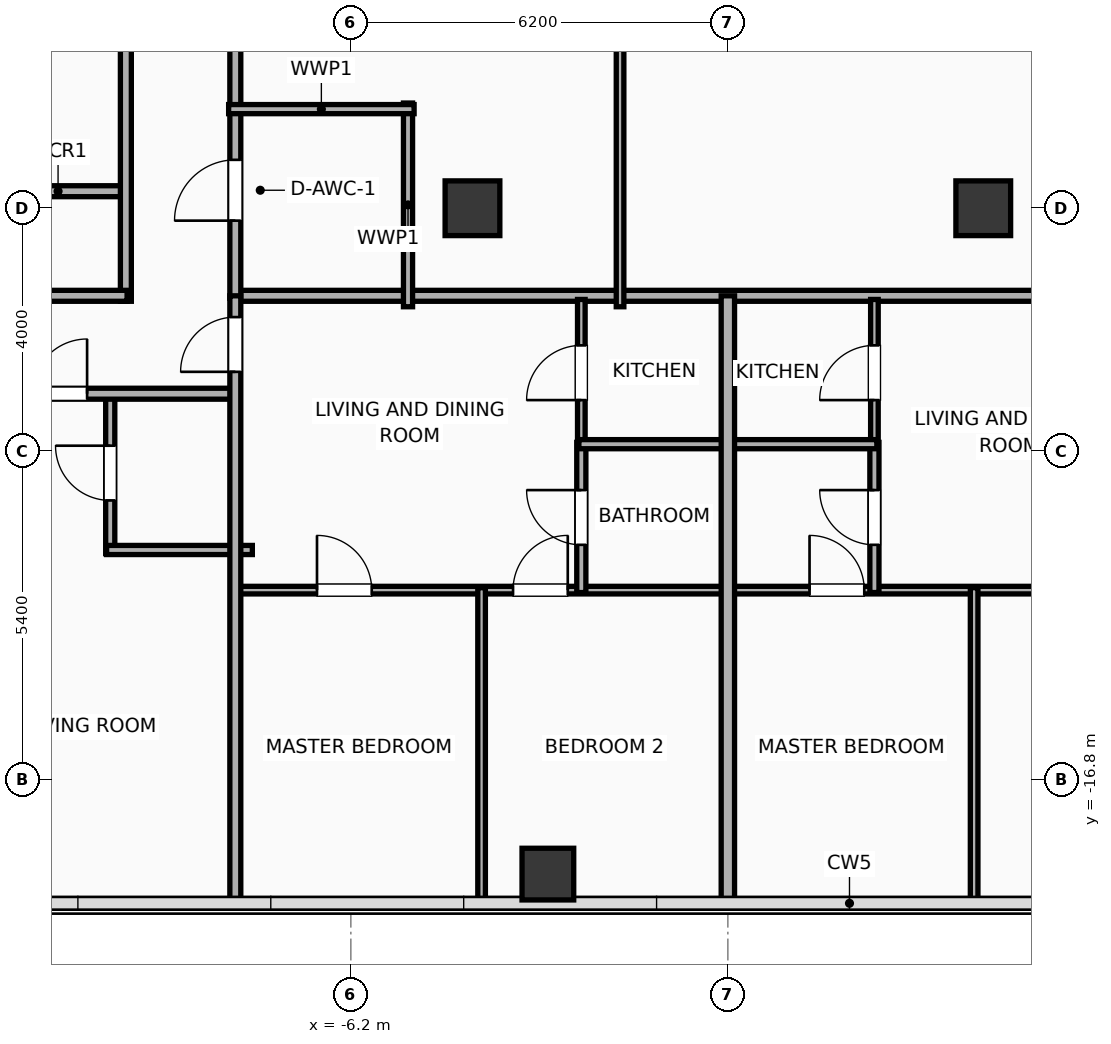
"""IFC4 building model, lengths in metres.
Left out: names, types, materials, properties, quantities, classifications, styles, units other than length and angle.
Written with IfcOpenShell. Run it as: python <this file> out.ifc"""

import sys

from ifc_helpers import new_model, si_unit, direction, frame, frame_2d, origin, origin_2d, place, context, subcontext, project, spatial, rectangle, hollow_rectangle, extrude, element, fill, save


model = new_model("IFC4")
c1 = context("Model", 3, precision=1e-05, world=origin(), true_north=direction((0.0, 1.0)))
c2 = subcontext(c1, "Body", "Model", "MODEL_VIEW")
j1 = project(units=[si_unit("LENGTHUNIT", "METRE"), si_unit("PLANEANGLEUNIT", "RADIAN")], contexts=[c1])
p1 = place(None, origin())
s1 = spatial("IfcSite", under=j1, at=p1, CompositionType="ELEMENT")
p2 = place(p1, origin())
s2 = spatial("IfcBuilding", under=s1, at=p2, CompositionType="ELEMENT")
p3 = place(p2, frame((0.0, 0.0, 204.1)))
s3 = spatial("IfcBuildingStorey", under=s2, at=p3, CompositionType="ELEMENT", Elevation=204.1)
for number, where, z_axis, x_axis in (
    (1, (-4.2, -7.4, 0.0), (0.0, 0.0, 1.0), (1.0, 0.0, 0.0)),
    (2, (4.2, -7.4, 0.0), (0.0, 0.0, 1.0), (1.0, 0.0, 0.0)),
):
    element("IfcColumn", number, at=place(p3, frame(where, z_axis=z_axis, x_axis=x_axis)), inside=s3, PredefinedType="COLUMN", context=c2, shape_type="SweptSolid", body=[
        extrude(rectangle(XDim=0.9, YDim=0.9, at=origin_2d()), origin(), (0.0, 0.0, 1.0), 3.9),
    ])
p4 = place(p3, frame((-2.96, -18.35, 0.0), z_axis=(0.0, 0.0, 1.0), x_axis=(1.0, 0.0, 0.0)))
e3 = element("IfcColumn", 3, at=p4, inside=s3, PredefinedType="COLUMN", context=c2, shape_type="SweptSolid", body=[
    extrude(hollow_rectangle(XDim=0.85, YDim=0.85, WallThickness=0.028, at=origin_2d()), origin(), (0.0, 0.0, 1.0), 3.9),
])
p5 = place(p3, frame((-12.15, -7.12, 0.0), z_axis=(0.0, 0.0, 1.0), x_axis=(1.0, 0.0, 0.0)))
e4 = element("IfcWall", 4, at=p5, inside=s3, PredefinedType="PARTITIONING", context=c2, shape_type="SweptSolid", body=[
    extrude(rectangle(XDim=2.27, YDim=0.18, at=frame_2d((1.135, 0.0))), origin(), (0.0, 0.0, 1.0), 3.65),
])
p6 = place(p3, frame((-9.9, -8.93, 0.0), z_axis=(0.0, 0.0, 1.0), x_axis=(0.0, 1.0, 0.0)))
e5 = element("IfcWall", 5, at=p6, inside=s3, PredefinedType="PARTITIONING", context=c2, shape_type="SweptSolid", body=[
    extrude(rectangle(XDim=17.86, YDim=0.18, at=frame_2d((8.93, 0.0))), origin(), (0.0, 0.0, 1.0), 3.65),
])
p7 = place(p6, frame((7.487, 0.0, 0.0)))
e6 = element("IfcOpeningElement", 6, at=p7, cuts=e5, PredefinedType="OPENING", context=c2, shape_type="SweptSolid", body=[
    extrude(rectangle(XDim=1.1, YDim=2.05, at=frame_2d((0.55, 1.025))), frame((0.0, 0.1, 0.0), z_axis=(0.0, -1.0, 0.0), x_axis=(1.0, 0.0, 0.0)), (0.0, 0.0, 1.0), 0.2),
])
p8 = place(p3, frame((-26.23, -8.84, 0.0), z_axis=(0.0, 0.0, 1.0), x_axis=(1.0, 0.0, 0.0)))
e7 = element("IfcWall", 7, at=p8, inside=s3, PredefinedType="PARTITIONING", context=c2, shape_type="SweptSolid", body=[
    extrude(rectangle(XDim=16.35, YDim=0.18, at=frame_2d((8.175, 0.0))), origin(), (0.0, 0.0, 1.0), 3.65),
])
p9 = place(p3, frame((-8.15, -8.84, 0.0), z_axis=(0.0, 0.0, 1.0), x_axis=(1.0, 0.0, 0.0)))
e8 = element("IfcWall", 8, at=p9, inside=s3, PredefinedType="PARTITIONING", context=c2, shape_type="SweptSolid", body=[
    extrude(rectangle(XDim=16.3, YDim=0.18, at=frame_2d((8.15, 0.0))), origin(), (0.0, 0.0, 1.0), 3.65),
])
p10 = place(p3, frame((-8.1, -8.88, 0.0), z_axis=(0.0, 0.0, 1.0), x_axis=(0.0, 1.0, 0.0)))
e9 = element("IfcWall", 9, at=p10, inside=s3, PredefinedType="PARTITIONING", context=c2, shape_type="SweptSolid", body=[
    extrude(rectangle(XDim=17.76, YDim=0.18, at=frame_2d((8.88, 0.0))), origin(), (0.0, 0.0, 1.0), 3.65),
])
p11 = place(p10, frame((1.276, 0.0, 0.0)))
e10 = element("IfcOpeningElement", 10, at=p11, cuts=e9, PredefinedType="OPENING", context=c2, shape_type="SweptSolid", body=[
    extrude(rectangle(XDim=1.0, YDim=2.05, at=frame_2d((0.5, 1.025))), frame((0.0, 0.1, 0.0), z_axis=(0.0, -1.0, 0.0), x_axis=(1.0, 0.0, 0.0)), (0.0, 0.0, 1.0), 0.2),
])
p12 = place(p10, frame((10.181, 0.0, 0.0)))
e11 = element("IfcOpeningElement", 11, at=p12, cuts=e9, PredefinedType="OPENING", context=c2, shape_type="SweptSolid", body=[
    extrude(rectangle(XDim=0.95, YDim=2.05, at=frame_2d((0.475, 1.025))), frame((0.0, 0.1, 0.0), z_axis=(0.0, -1.0, 0.0), x_axis=(1.0, 0.0, 0.0)), (0.0, 0.0, 1.0), 0.2),
])
p13 = place(p3, frame((-5.26, -9.02, 0.0), z_axis=(0.0, 0.0, 1.0), x_axis=(0.0, 1.0, 0.0)))
e12 = element("IfcWall", 12, at=p13, inside=s3, PredefinedType="PLUMBINGWALL", context=c2, shape_type="SweptSolid", body=[
    extrude(rectangle(XDim=3.35, YDim=0.15, at=frame_2d((1.675, 0.0))), origin(), (0.0, 0.0, 1.0), 3.65),
])
p14 = place(p3, frame((-8.21, -5.77, 0.0), z_axis=(0.0, 0.0, 1.0), x_axis=(1.0, 0.0, 0.0)))
e13 = element("IfcWall", 13, at=p14, inside=s3, PredefinedType="PLUMBINGWALL", context=c2, shape_type="SweptSolid", body=[
    extrude(rectangle(XDim=3.05, YDim=0.15, at=frame_2d((1.525, 0.0))), origin(), (0.0, 0.0, 1.0), 3.65),
])
p15 = place(p3, frame((-1.773, -9.02, 0.0), z_axis=(0.0, 0.0, 1.0), x_axis=(0.0, 1.0, 0.0)))
e14 = element("IfcWall", 14, at=p15, inside=s3, PredefinedType="PARTITIONING", context=c2, shape_type="SweptSolid", body=[
    extrude(rectangle(XDim=17.99, YDim=0.125, at=frame_2d((8.995, 0.0))), origin(), (0.0, 0.0, 1.0), 3.65),
])
p16 = place(p15, frame((8.52, 0.0, 0.0)))
e15 = element("IfcOpeningElement", 15, at=p16, cuts=e14, PredefinedType="OPENING", context=c2, shape_type="SweptSolid", body=[
    extrude(rectangle(XDim=0.95, YDim=2.05, at=frame_2d((0.475, 1.025))), frame((0.0, 0.073, 0.0), z_axis=(0.0, -1.0, 0.0), x_axis=(1.0, 0.0, 0.0)), (0.0, 0.0, 1.0), 0.145),
])
p17 = place(p3, frame((-10.157, -13.08, 0.0), z_axis=(0.0, 0.0, 1.0), x_axis=(0.0, 1.0, 0.0)))
e16 = element("IfcWall", 16, at=p17, inside=s3, PredefinedType="PLUMBINGWALL", context=c2, shape_type="SweptSolid", body=[
    extrude(rectangle(XDim=2.65, YDim=0.15, at=frame_2d((1.325, 0.0))), origin(), (0.0, 0.0, 1.0), 3.65),
])
p18 = place(p17, frame((0.875, 0.0, 0.0)))
e17 = element("IfcOpeningElement", 17, at=p18, cuts=e16, PredefinedType="OPENING", context=c2, shape_type="SweptSolid", body=[
    extrude(rectangle(XDim=0.9, YDim=2.05, at=frame_2d((0.45, 1.025))), frame((0.0, 0.085, 0.0), z_axis=(0.0, -1.0, 0.0), x_axis=(1.0, 0.0, 0.0)), (0.0, 0.0, 1.0), 0.17),
])
p19 = place(p3, frame((-10.217, -13.02, 0.0), z_axis=(0.0, 0.0, 1.0), x_axis=(1.0, 0.0, 0.0)))
e18 = element("IfcWall", 18, at=p19, inside=s3, PredefinedType="PLUMBINGWALL", context=c2, shape_type="SweptSolid", body=[
    extrude(rectangle(XDim=2.397, YDim=0.15, at=frame_2d((1.198, 0.0))), origin(), (0.0, 0.0, 1.0), 3.65),
])
p20 = place(p3, frame((-26.23, -10.45, 0.0), z_axis=(0.0, 0.0, 1.0), x_axis=(1.0, 0.0, 0.0)))
e19 = element("IfcWall", 19, at=p20, inside=s3, PredefinedType="PARTITIONING", context=c2, shape_type="SweptSolid", body=[
    extrude(rectangle(XDim=18.15, YDim=0.18, at=frame_2d((9.075, 0.0))), origin(), (0.0, 0.0, 1.0), 3.65),
])
p21 = place(p20, frame((2.414, 0.0, 0.0)))
e20 = element("IfcOpeningElement", 20, at=p21, cuts=e19, PredefinedType="OPENING", context=c2, shape_type="SweptSolid", body=[
    extrude(rectangle(XDim=1.15, YDim=2.05, at=frame_2d((0.575, 1.025))), frame((0.0, 0.1, 0.0), z_axis=(0.0, -1.0, 0.0), x_axis=(1.0, 0.0, 0.0)), (0.0, 0.0, 1.0), 0.2),
])
p22 = place(p20, frame((9.571, 0.0, 0.0)))
e21 = element("IfcOpeningElement", 21, at=p22, cuts=e19, PredefinedType="OPENING", context=c2, shape_type="SweptSolid", body=[
    extrude(rectangle(XDim=1.15, YDim=2.05, at=frame_2d((0.575, 1.025))), frame((0.0, 0.1, 0.0), z_axis=(0.0, -1.0, 0.0), x_axis=(1.0, 0.0, 0.0)), (0.0, 0.0, 1.0), 0.2),
])
p23 = place(p20, frame((14.792, 0.0, 0.0)))
e22 = element("IfcOpeningElement", 22, at=p23, cuts=e19, PredefinedType="OPENING", context=c2, shape_type="SweptSolid", body=[
    extrude(rectangle(XDim=0.9, YDim=2.05, at=frame_2d((0.45, 1.025))), frame((0.0, 0.1, 0.0), z_axis=(0.0, -1.0, 0.0), x_axis=(1.0, 0.0, 0.0)), (0.0, 0.0, 1.0), 0.2),
])
p24 = place(p3, frame((-8.08, -13.68, 0.0), z_axis=(0.0, 0.0, 1.0), x_axis=(1.0, 0.0, 0.0)))
e23 = element("IfcWall", 23, at=p24, inside=s3, PredefinedType="PARTITIONING", context=c2, shape_type="SweptSolid", body=[
    extrude(rectangle(XDim=8.06, YDim=0.125, at=frame_2d((4.03, 0.0))), origin(), (0.0, 0.0, 1.0), 3.65),
])
p25 = place(p24, frame((1.323, 0.0, 0.0)))
e24 = element("IfcOpeningElement", 24, at=p25, cuts=e23, PredefinedType="OPENING", context=c2, shape_type="SweptSolid", body=[
    extrude(rectangle(XDim=0.9, YDim=2.05, at=frame_2d((0.45, 1.025))), frame((0.0, 0.073, 0.0), z_axis=(0.0, -1.0, 0.0), x_axis=(1.0, 0.0, 0.0)), (0.0, 0.0, 1.0), 0.145),
])
p26 = place(p24, frame((4.547, 0.0, 0.0)))
e25 = element("IfcOpeningElement", 25, at=p26, cuts=e23, PredefinedType="OPENING", context=c2, shape_type="SweptSolid", body=[
    extrude(rectangle(XDim=0.9, YDim=2.05, at=frame_2d((0.45, 1.025))), frame((0.0, 0.073, 0.0), z_axis=(0.0, -1.0, 0.0), x_axis=(1.0, 0.0, 0.0)), (0.0, 0.0, 1.0), 0.145),
])
p27 = place(p3, frame((-2.41, -11.31, 0.0), z_axis=(0.0, 0.0, 1.0), x_axis=(0.0, 1.0, 0.0)))
e26 = element("IfcWall", 26, at=p27, inside=s3, PredefinedType="PARTITIONING", context=c2, shape_type="SweptSolid", body=[
    extrude(rectangle(XDim=2.41, YDim=0.125, at=frame_2d((1.205, 0.0))), origin(), (0.0, 0.0, 1.0), 3.65),
])
p28 = place(p27, frame((0.755, 0.0, 0.0)))
e27 = element("IfcOpeningElement", 27, at=p28, cuts=e26, PredefinedType="OPENING", context=c2, shape_type="SweptSolid", body=[
    extrude(rectangle(XDim=0.9, YDim=2.05, at=frame_2d((0.45, 1.025))), frame((0.0, 0.073, 0.0), z_axis=(0.0, -1.0, 0.0), x_axis=(1.0, 0.0, 0.0)), (0.0, 0.0, 1.0), 0.145),
])
p29 = place(p3, frame((-2.41, -13.72, 0.0), z_axis=(0.0, 0.0, 1.0), x_axis=(0.0, 1.0, 0.0)))
e28 = element("IfcWall", 28, at=p29, inside=s3, PredefinedType="PLUMBINGWALL", context=c2, shape_type="SweptSolid", body=[
    extrude(rectangle(XDim=2.47, YDim=0.15, at=frame_2d((1.235, 0.0))), origin(), (0.0, 0.0, 1.0), 3.65),
])
p30 = place(p29, frame((0.785, 0.0, 0.0)))
e29 = element("IfcOpeningElement", 29, at=p30, cuts=e28, PredefinedType="OPENING", context=c2, shape_type="SweptSolid", body=[
    extrude(rectangle(XDim=0.9, YDim=2.05, at=frame_2d((0.45, 1.025))), frame((0.0, 0.085, 0.0), z_axis=(0.0, -1.0, 0.0), x_axis=(1.0, 0.0, 0.0)), (0.0, 0.0, 1.0), 0.17),
])
p31 = place(p3, frame((-2.45, -11.28, 0.0), z_axis=(0.0, 0.0, 1.0), x_axis=(1.0, 0.0, 0.0)))
e30 = element("IfcWall", 30, at=p31, inside=s3, PredefinedType="PLUMBINGWALL", context=c2, shape_type="SweptSolid", body=[
    extrude(rectangle(XDim=2.43, YDim=0.15, at=frame_2d((1.215, 0.0))), origin(), (0.0, 0.0, 1.0), 3.65),
])
p32 = place(p3, frame((-4.05, -18.83, 0.0), z_axis=(0.0, 0.0, 1.0), x_axis=(0.0, 1.0, 0.0)))
e31 = element("IfcWall", 31, at=p32, inside=s3, PredefinedType="PARTITIONING", context=c2, shape_type="SweptSolid", body=[
    extrude(rectangle(XDim=5.19, YDim=0.125, at=frame_2d((2.595, 0.0))), origin(), (0.0, 0.0, 1.0), 3.65),
])
p33 = place(p3, frame((-8.1, -18.83, 0.0), z_axis=(0.0, 0.0, 1.0), x_axis=(0.0, 1.0, 0.0)))
e32 = element("IfcWall", 32, at=p33, inside=s3, PredefinedType="PARTITIONING", context=c2, shape_type="SweptSolid", body=[
    extrude(rectangle(XDim=9.99, YDim=0.18, at=frame_2d((4.995, 0.0))), origin(), (0.0, 0.0, 1.0), 3.65),
])
p34 = place(p33, frame((8.74, 0.0, 0.0)))
e33 = element("IfcOpeningElement", 33, at=p34, cuts=e32, PredefinedType="OPENING", context=c2, shape_type="SweptSolid", body=[
    extrude(rectangle(XDim=0.9, YDim=2.05, at=frame_2d((0.45, 1.025))), frame((0.0, 0.1, 0.0), z_axis=(0.0, -1.0, 0.0), x_axis=(1.0, 0.0, 0.0)), (0.0, 0.0, 1.0), 0.2),
])
p35 = place(p3, frame((0.02, -13.68, 0.0), z_axis=(0.0, 0.0, 1.0), x_axis=(1.0, 0.0, 0.0)))
e34 = element("IfcWall", 34, at=p35, inside=s3, PredefinedType="PARTITIONING", context=c2, shape_type="SweptSolid", body=[
    extrude(rectangle(XDim=8.06, YDim=0.125, at=frame_2d((4.03, 0.0))), origin(), (0.0, 0.0, 1.0), 3.65),
])
p36 = place(p35, frame((1.323, 0.0, 0.0)))
e35 = element("IfcOpeningElement", 35, at=p36, cuts=e34, PredefinedType="OPENING", context=c2, shape_type="SweptSolid", body=[
    extrude(rectangle(XDim=0.9, YDim=2.05, at=frame_2d((0.45, 1.025))), frame((0.0, 0.073, 0.0), z_axis=(0.0, -1.0, 0.0), x_axis=(1.0, 0.0, 0.0)), (0.0, 0.0, 1.0), 0.145),
])
p37 = place(p35, frame((5.837, 0.0, 0.0)))
e36 = element("IfcOpeningElement", 36, at=p37, cuts=e34, PredefinedType="OPENING", context=c2, shape_type="SweptSolid", body=[
    extrude(rectangle(XDim=0.9, YDim=2.05, at=frame_2d((0.45, 1.025))), frame((0.0, 0.073, 0.0), z_axis=(0.0, -1.0, 0.0), x_axis=(1.0, 0.0, 0.0)), (0.0, 0.0, 1.0), 0.145),
])
p38 = place(p3, frame((2.41, -11.31, 0.0), z_axis=(0.0, 0.0, 1.0), x_axis=(0.0, 1.0, 0.0)))
e37 = element("IfcWall", 37, at=p38, inside=s3, PredefinedType="PARTITIONING", context=c2, shape_type="SweptSolid", body=[
    extrude(rectangle(XDim=2.41, YDim=0.125, at=frame_2d((1.205, 0.0))), origin(), (0.0, 0.0, 1.0), 3.65),
])
p39 = place(p38, frame((0.755, 0.0, 0.0)))
e38 = element("IfcOpeningElement", 38, at=p39, cuts=e37, PredefinedType="OPENING", context=c2, shape_type="SweptSolid", body=[
    extrude(rectangle(XDim=0.9, YDim=2.05, at=frame_2d((0.45, 1.025))), frame((0.0, 0.073, 0.0), z_axis=(0.0, -1.0, 0.0), x_axis=(1.0, 0.0, 0.0)), (0.0, 0.0, 1.0), 0.145),
])
p40 = place(p3, frame((2.41, -13.72, 0.0), z_axis=(0.0, 0.0, 1.0), x_axis=(0.0, 1.0, 0.0)))
e39 = element("IfcWall", 39, at=p40, inside=s3, PredefinedType="PLUMBINGWALL", context=c2, shape_type="SweptSolid", body=[
    extrude(rectangle(XDim=2.47, YDim=0.15, at=frame_2d((1.235, 0.0))), origin(), (0.0, 0.0, 1.0), 3.65),
])
p41 = place(p40, frame((0.785, 0.0, 0.0)))
e40 = element("IfcOpeningElement", 40, at=p41, cuts=e39, PredefinedType="OPENING", context=c2, shape_type="SweptSolid", body=[
    extrude(rectangle(XDim=0.9, YDim=2.05, at=frame_2d((0.45, 1.025))), frame((0.0, 0.085, 0.0), z_axis=(0.0, -1.0, 0.0), x_axis=(1.0, 0.0, 0.0)), (0.0, 0.0, 1.0), 0.17),
])
p42 = place(p3, frame((0.02, -11.28, 0.0), z_axis=(0.0, 0.0, 1.0), x_axis=(1.0, 0.0, 0.0)))
e41 = element("IfcWall", 41, at=p42, inside=s3, PredefinedType="PLUMBINGWALL", context=c2, shape_type="SweptSolid", body=[
    extrude(rectangle(XDim=2.43, YDim=0.15, at=frame_2d((1.215, 0.0))), origin(), (0.0, 0.0, 1.0), 3.65),
])
p43 = place(p3, frame((4.05, -18.83, 0.0), z_axis=(0.0, 0.0, 1.0), x_axis=(0.0, 1.0, 0.0)))
e42 = element("IfcWall", 42, at=p43, inside=s3, PredefinedType="PARTITIONING", context=c2, shape_type="SweptSolid", body=[
    extrude(rectangle(XDim=5.19, YDim=0.125, at=frame_2d((2.595, 0.0))), origin(), (0.0, 0.0, 1.0), 3.65),
])
p44 = place(p3, frame((0.0, -18.83, 0.0), z_axis=(0.0, 0.0, 1.0), x_axis=(0.0, 1.0, 0.0)))
e43 = element("IfcWall", 43, at=p44, inside=s3, PredefinedType="PARTITIONING", context=c2, shape_type="SweptSolid", body=[
    extrude(rectangle(XDim=9.99, YDim=0.22, at=frame_2d((4.995, 0.0))), origin(), (0.0, 0.0, 1.0), 3.65),
])
p45 = place(p11, origin())
e44 = element("IfcDoor", 44, at=p45, inside=s3, OperationType="SINGLE_SWING_LEFT", PredefinedType="DOOR", context=c2, shape_type="SweptSolid", body=[
    extrude(rectangle(XDim=1.0, YDim=2.05, at=frame_2d((0.5, 1.025))), frame((0.0, 0.025, 0.0), z_axis=(0.0, -1.0, 0.0), x_axis=(1.0, 0.0, 0.0)), (0.0, 0.0, 1.0), 0.05),
])
fill(e10, e44)
p46 = place(p18, origin())
e45 = element("IfcDoor", 45, at=p46, inside=s3, OperationType="SINGLE_SWING_RIGHT", PredefinedType="DOOR", context=c2, shape_type="SweptSolid", body=[
    extrude(rectangle(XDim=0.9, YDim=2.05, at=frame_2d((0.45, 1.025))), frame((0.0, 0.025, 0.0), z_axis=(0.0, -1.0, 0.0), x_axis=(1.0, 0.0, 0.0)), (0.0, 0.0, 1.0), 0.05),
])
fill(e17, e45)
p47 = place(p23, origin())
e46 = element("IfcDoor", 46, at=p47, inside=s3, OperationType="SINGLE_SWING_RIGHT", PredefinedType="DOOR", context=c2, shape_type="SweptSolid", body=[
    extrude(rectangle(XDim=0.9, YDim=2.05, at=frame_2d((0.45, 1.025))), frame((0.0, 0.025, 0.0), z_axis=(0.0, -1.0, 0.0), x_axis=(1.0, 0.0, 0.0)), (0.0, 0.0, 1.0), 0.05),
])
fill(e22, e46)
p48 = place(p25, origin())
e47 = element("IfcDoor", 47, at=p48, inside=s3, OperationType="SINGLE_SWING_LEFT", PredefinedType="DOOR", context=c2, shape_type="SweptSolid", body=[
    extrude(rectangle(XDim=0.9, YDim=2.05, at=frame_2d((0.45, 1.025))), frame((0.0, 0.025, 0.0), z_axis=(0.0, -1.0, 0.0), x_axis=(1.0, 0.0, 0.0)), (0.0, 0.0, 1.0), 0.05),
])
fill(e24, e47)
p49 = place(p26, origin())
e48 = element("IfcDoor", 48, at=p49, inside=s3, OperationType="SINGLE_SWING_RIGHT", PredefinedType="DOOR", context=c2, shape_type="SweptSolid", body=[
    extrude(rectangle(XDim=0.9, YDim=2.05, at=frame_2d((0.45, 1.025))), frame((0.0, 0.025, 0.0), z_axis=(0.0, -1.0, 0.0), x_axis=(1.0, 0.0, 0.0)), (0.0, 0.0, 1.0), 0.05),
])
fill(e25, e48)
p50 = place(p28, origin())
e49 = element("IfcDoor", 49, at=p50, inside=s3, OperationType="SINGLE_SWING_LEFT", PredefinedType="DOOR", context=c2, shape_type="SweptSolid", body=[
    extrude(rectangle(XDim=0.9, YDim=2.05, at=frame_2d((0.45, 1.025))), frame((0.0, 0.025, 0.0), z_axis=(0.0, -1.0, 0.0), x_axis=(1.0, 0.0, 0.0)), (0.0, 0.0, 1.0), 0.05),
])
fill(e27, e49)
p51 = place(p30, origin())
e50 = element("IfcDoor", 50, at=p51, inside=s3, OperationType="SINGLE_SWING_RIGHT", PredefinedType="DOOR", context=c2, shape_type="SweptSolid", body=[
    extrude(rectangle(XDim=0.9, YDim=2.05, at=frame_2d((0.45, 1.025))), frame((0.0, 0.025, 0.0), z_axis=(0.0, -1.0, 0.0), x_axis=(1.0, 0.0, 0.0)), (0.0, 0.0, 1.0), 0.05),
])
fill(e29, e50)
p52 = place(p34, origin())
e51 = element("IfcDoor", 51, at=p52, inside=s3, OperationType="SINGLE_SWING_LEFT", PredefinedType="DOOR", context=c2, shape_type="SweptSolid", body=[
    extrude(rectangle(XDim=0.9, YDim=2.05, at=frame_2d((0.45, 1.025))), frame((0.0, 0.025, 0.0), z_axis=(0.0, -1.0, 0.0), x_axis=(1.0, 0.0, 0.0)), (0.0, 0.0, 1.0), 0.05),
])
fill(e33, e51)
p53 = place(p36, origin())
e52 = element("IfcDoor", 52, at=p53, inside=s3, OperationType="SINGLE_SWING_LEFT", PredefinedType="DOOR", context=c2, shape_type="SweptSolid", body=[
    extrude(rectangle(XDim=0.9, YDim=2.05, at=frame_2d((0.45, 1.025))), frame((0.0, 0.025, 0.0), z_axis=(0.0, -1.0, 0.0), x_axis=(1.0, 0.0, 0.0)), (0.0, 0.0, 1.0), 0.05),
])
fill(e35, e52)
p54 = place(p39, origin())
e53 = element("IfcDoor", 53, at=p54, inside=s3, OperationType="SINGLE_SWING_LEFT", PredefinedType="DOOR", context=c2, shape_type="SweptSolid", body=[
    extrude(rectangle(XDim=0.9, YDim=2.05, at=frame_2d((0.45, 1.025))), frame((0.0, 0.025, 0.0), z_axis=(0.0, -1.0, 0.0), x_axis=(1.0, 0.0, 0.0)), (0.0, 0.0, 1.0), 0.05),
])
fill(e38, e53)
p55 = place(p41, origin())
e54 = element("IfcDoor", 54, at=p55, inside=s3, OperationType="SINGLE_SWING_RIGHT", PredefinedType="DOOR", context=c2, shape_type="SweptSolid", body=[
    extrude(rectangle(XDim=0.9, YDim=2.05, at=frame_2d((0.45, 1.025))), frame((0.0, 0.025, 0.0), z_axis=(0.0, -1.0, 0.0), x_axis=(1.0, 0.0, 0.0)), (0.0, 0.0, 1.0), 0.05),
])
fill(e40, e54)
save(model, sys.argv[1])
